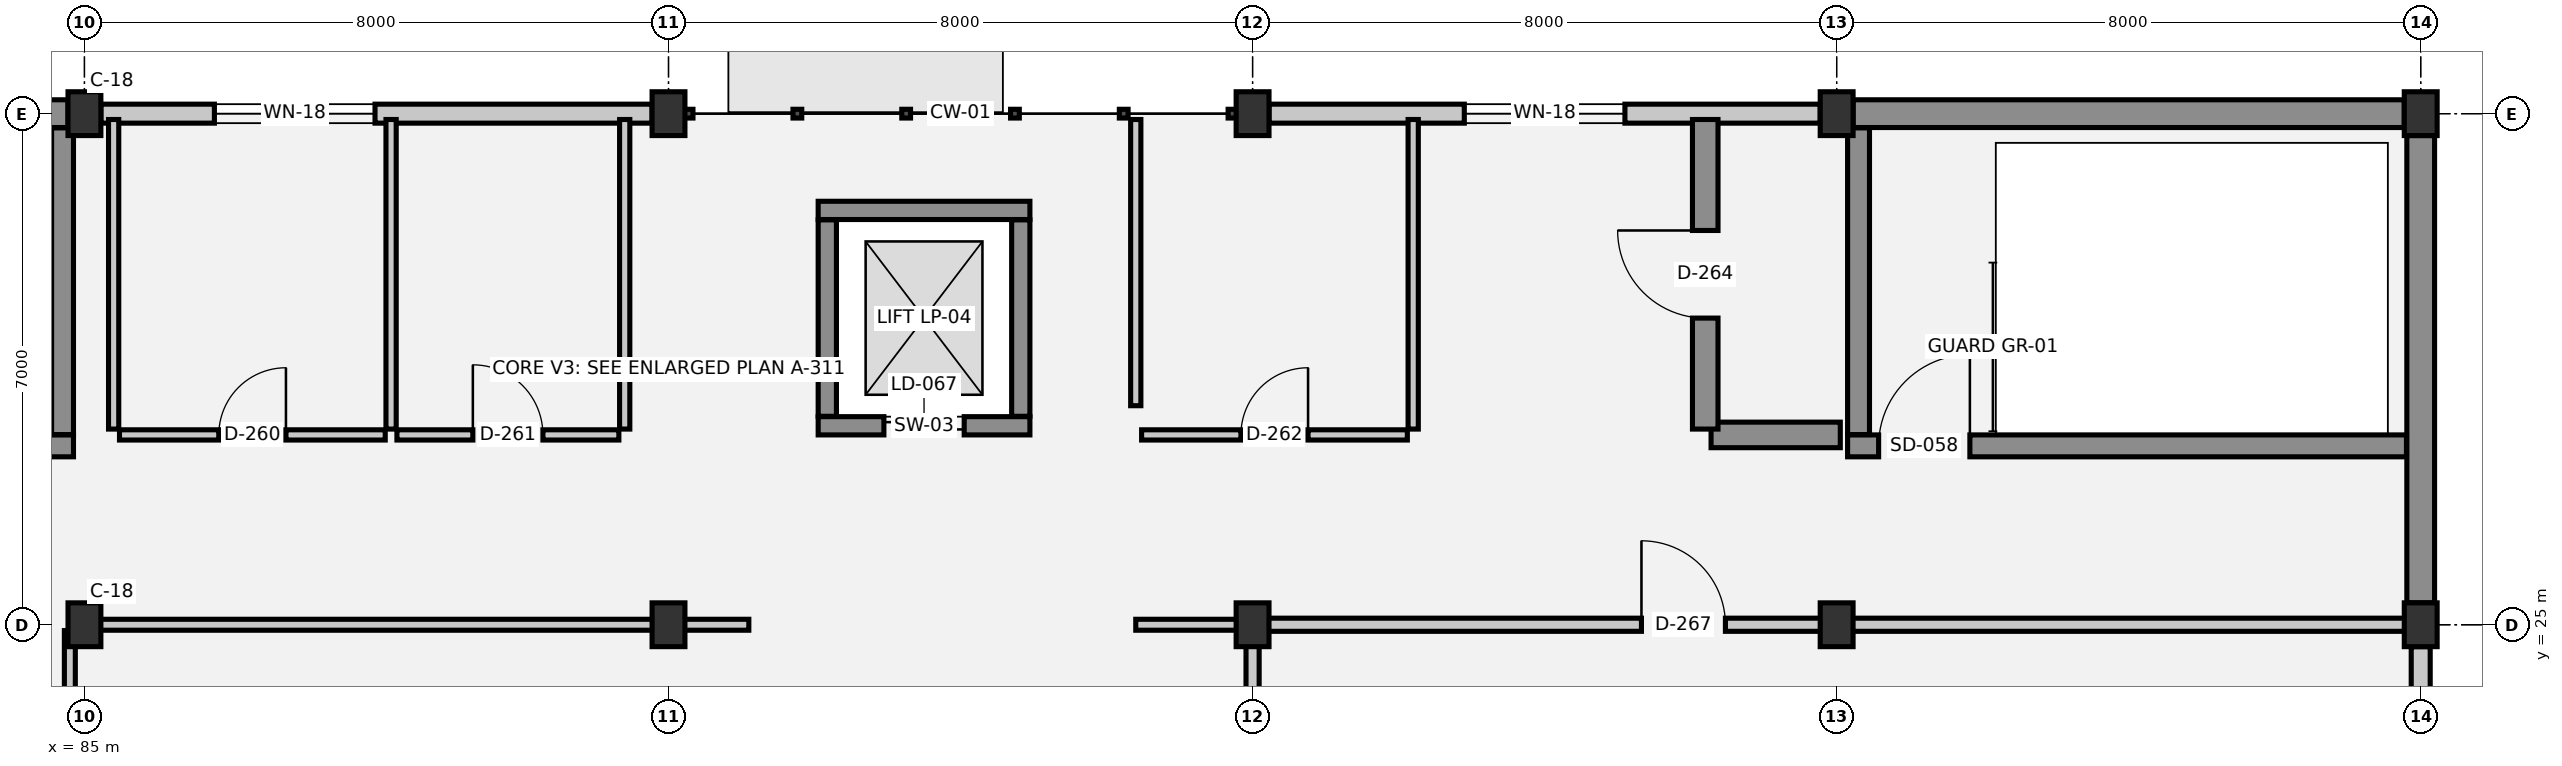
"""IFC4 building model, lengths in metres.
Left out: names, types, materials, properties, quantities, classifications, styles, units other than length and angle.
Written with IfcOpenShell. Run it as: python <this file> out.ifc"""

import sys

from ifc_helpers import new_model, si_unit, direction, frame, frame_2d, origin, origin_2d, place, context, subcontext, project, spatial, rectangle, extrude, element, fill, save


model = new_model("IFC4")
c1 = context("Model", 3, precision=1e-05, world=origin(), true_north=direction((0.0, 1.0)))
c2 = subcontext(c1, "Body", "Model", "MODEL_VIEW")
j1 = project(units=[si_unit("LENGTHUNIT", "METRE"), si_unit("PLANEANGLEUNIT", "RADIAN")], contexts=[c1])
p1 = place(None, origin())
s1 = spatial("IfcSite", under=j1, at=p1, CompositionType="ELEMENT")
p2 = place(p1, origin())
s2 = spatial("IfcBuilding", under=s1, at=p2, CompositionType="ELEMENT")
p3 = place(p2, frame((0.0, 0.0, 22.05)))
s3 = spatial("IfcBuildingStorey", under=s2, at=p3, CompositionType="ELEMENT", Elevation=22.05)
for number, where, z_axis, x_axis in (
    (1, (85.0, 25.0, 0.0), (0.0, 0.0, 1.0), (1.0, 0.0, 0.0)),
    (2, (85.0, 32.0, 0.0), (0.0, 0.0, 1.0), (1.0, 0.0, 0.0)),
    (3, (93.0, 25.0, 0.0), (0.0, 0.0, 1.0), (1.0, 0.0, 0.0)),
    (4, (93.0, 32.0, 0.0), (0.0, 0.0, 1.0), (1.0, 0.0, 0.0)),
    (5, (101.0, 25.0, 0.0), (0.0, 0.0, 1.0), (1.0, 0.0, 0.0)),
    (6, (101.0, 32.0, 0.0), (0.0, 0.0, 1.0), (1.0, 0.0, 0.0)),
    (7, (109.0, 25.0, 0.0), (0.0, 0.0, 1.0), (1.0, 0.0, 0.0)),
    (8, (109.0, 32.0, 0.0), (0.0, 0.0, 1.0), (1.0, 0.0, 0.0)),
    (9, (117.0, 25.0, 0.0), (0.0, 0.0, 1.0), (1.0, 0.0, 0.0)),
    (10, (117.0, 32.0, 0.0), (0.0, 0.0, 1.0), (1.0, 0.0, 0.0)),
):
    element("IfcColumn", number, at=place(p3, frame(where, z_axis=z_axis, x_axis=x_axis)), inside=s3, PredefinedType="COLUMN", context=c2, shape_type="SweptSolid", body=[
        extrude(rectangle(XDim=0.45, YDim=0.6, at=origin_2d()), origin(), (0.0, 0.0, 1.0), 3.75),
    ])
p4 = place(p3, frame((77.225, 32.0, 0.0), z_axis=(0.0, 0.0, 1.0), x_axis=(1.0, 0.0, 0.0)))
e11 = element("IfcWall", 11, at=p4, inside=s3, PredefinedType="STANDARD", context=c2, shape_type="SweptSolid", body=[
    extrude(rectangle(XDim=7.55, YDim=0.38, at=frame_2d((3.775, 0.0))), origin(), (0.0, 0.0, 1.0), 2.71),
])
p5 = place(p3, frame((85.225, 32.0, 0.0), z_axis=(0.0, 0.0, 1.0), x_axis=(1.0, 0.0, 0.0)))
e12 = element("IfcWall", 12, at=p5, inside=s3, PredefinedType="SOLIDWALL", context=c2, shape_type="SweptSolid", body=[
    extrude(rectangle(XDim=7.55, YDim=0.26, at=frame_2d((3.775, 0.0))), origin(), (0.0, 0.0, 1.0), 2.71),
])
p6 = place(p5, frame((1.555, 0.0, 0.9)))
e13 = element("IfcOpeningElement", 13, at=p6, cuts=e12, PredefinedType="OPENING", context=c2, shape_type="SweptSolid", body=[
    extrude(rectangle(XDim=2.2, YDim=1.0, at=frame_2d((1.1, 0.5))), frame((0.0, 0.14, 0.0), z_axis=(0.0, -1.0, 0.0), x_axis=(1.0, 0.0, 0.0)), (0.0, 0.0, 1.0), 0.28),
])
p7 = place(p3, frame((101.225, 32.0, 0.0), z_axis=(0.0, 0.0, 1.0), x_axis=(1.0, 0.0, 0.0)))
e14 = element("IfcWall", 14, at=p7, inside=s3, PredefinedType="SOLIDWALL", context=c2, shape_type="SweptSolid", body=[
    extrude(rectangle(XDim=7.55, YDim=0.26, at=frame_2d((3.775, 0.0))), origin(), (0.0, 0.0, 1.0), 2.71),
])
p8 = place(p7, frame((2.675, 0.0, 0.9)))
e15 = element("IfcOpeningElement", 15, at=p8, cuts=e14, PredefinedType="OPENING", context=c2, shape_type="SweptSolid", body=[
    extrude(rectangle(XDim=2.2, YDim=1.0, at=frame_2d((1.1, 0.5))), frame((0.0, 0.14, 0.0), z_axis=(0.0, -1.0, 0.0), x_axis=(1.0, 0.0, 0.0)), (0.0, 0.0, 1.0), 0.28),
])
p9 = place(p3, frame((109.225, 32.0, 0.0), z_axis=(0.0, 0.0, 1.0), x_axis=(1.0, 0.0, 0.0)))
e16 = element("IfcWall", 16, at=p9, inside=s3, PredefinedType="STANDARD", context=c2, shape_type="SweptSolid", body=[
    extrude(rectangle(XDim=7.55, YDim=0.38, at=frame_2d((3.775, 0.0))), origin(), (0.0, 0.0, 1.0), 2.71),
])
p10 = place(p3, frame((117.0, 31.7, 0.0), z_axis=(0.0, 0.0, 1.0), x_axis=(0.0, -1.0, 0.0)))
e17 = element("IfcWall", 17, at=p10, inside=s3, PredefinedType="STANDARD", context=c2, shape_type="SweptSolid", body=[
    extrude(rectangle(XDim=6.4, YDim=0.38, at=frame_2d((3.2, 0.0))), origin(), (0.0, 0.0, 1.0), 2.71),
])
p11 = place(p3, frame((117.0, 24.7, 0.0), z_axis=(0.0, 0.0, 1.0), x_axis=(0.0, -1.0, 0.0)))
e18 = element("IfcWall", 18, at=p11, inside=s3, PredefinedType="SOLIDWALL", context=c2, shape_type="SweptSolid", body=[
    extrude(rectangle(XDim=7.4, YDim=0.26, at=frame_2d((3.7, 0.0))), origin(), (0.0, 0.0, 1.0), 2.71),
])
p12 = place(p11, frame((2.6, 0.0, 0.9)))
e19 = element("IfcOpeningElement", 19, at=p12, cuts=e18, PredefinedType="OPENING", context=c2, shape_type="SweptSolid", body=[
    extrude(rectangle(XDim=2.2, YDim=1.0, at=frame_2d((1.1, 0.5))), frame((0.0, 0.14, 0.0), z_axis=(0.0, -1.0, 0.0), x_axis=(1.0, 0.0, 0.0)), (0.0, 0.0, 1.0), 0.28),
])
p13 = place(p3, frame((95.05, 27.725, 0.0), z_axis=(0.0, 0.0, 1.0), x_axis=(1.0, 0.0, 0.0)))
e20 = element("IfcWall", 20, at=p13, inside=s3, PredefinedType="SHEAR", context=c2, shape_type="SweptSolid", body=[
    extrude(rectangle(XDim=2.9, YDim=0.25, at=frame_2d((1.45, 0.0))), origin(), (0.0, 0.0, 1.0), 3.47),
])
p14 = place(p13, frame((0.9, 0.0, 0.0)))
e21 = element("IfcOpeningElement", 21, at=p14, cuts=e20, PredefinedType="OPENING", context=c2, shape_type="SweptSolid", body=[
    extrude(rectangle(XDim=1.1, YDim=2.15, at=frame_2d((0.55, 1.075))), frame((0.0, 0.135, 0.0), z_axis=(0.0, -1.0, 0.0), x_axis=(1.0, 0.0, 0.0)), (0.0, 0.0, 1.0), 0.27),
])
p15 = place(p3, frame((97.95, 30.675, 0.0), z_axis=(0.0, 0.0, 1.0), x_axis=(-1.0, 0.0, 0.0)))
e22 = element("IfcWall", 22, at=p15, inside=s3, PredefinedType="SHEAR", context=c2, shape_type="SweptSolid", body=[
    extrude(rectangle(XDim=2.9, YDim=0.25, at=frame_2d((1.45, 0.0))), origin(), (0.0, 0.0, 1.0), 3.47),
])
for number, where, z_axis, x_axis in (
    (23, (95.175, 30.545, 0.0), (0.0, 0.0, 1.0), (0.0, -1.0, 0.0)),
    (24, (97.825, 27.855, 0.0), (0.0, 0.0, 1.0), (0.0, 1.0, 0.0)),
):
    element("IfcWall", number, at=place(p3, frame(where, z_axis=z_axis, x_axis=x_axis)), inside=s3, PredefinedType="SHEAR", context=c2, shape_type="SweptSolid", body=[
        extrude(rectangle(XDim=2.69, YDim=0.25, at=frame_2d((1.345, 0.0))), origin(), (0.0, 0.0, 1.0), 3.47),
    ])
p16 = place(p3, frame((77.195, 27.45, 0.0), z_axis=(0.0, 0.0, 1.0), x_axis=(1.0, 0.0, 0.0)))
e25 = element("IfcWall", 25, at=p16, inside=s3, PredefinedType="SHEAR", context=c2, shape_type="SweptSolid", body=[
    extrude(rectangle(XDim=7.655, YDim=0.3, at=frame_2d((3.828, 0.0))), origin(), (0.0, 0.0, 1.0), 3.47),
])
p17 = place(p16, frame((0.38, 0.0, 0.0)))
e26 = element("IfcOpeningElement", 26, at=p17, cuts=e25, PredefinedType="OPENING", context=c2, shape_type="SweptSolid", body=[
    extrude(rectangle(XDim=1.25, YDim=2.15, at=frame_2d((0.625, 1.075))), frame((0.0, 0.16, 0.0), z_axis=(0.0, -1.0, 0.0), x_axis=(1.0, 0.0, 0.0)), (0.0, 0.0, 1.0), 0.32),
])
p18 = place(p3, frame((84.7, 27.605, 0.0), z_axis=(0.0, 0.0, 1.0), x_axis=(0.0, 1.0, 0.0)))
e27 = element("IfcWall", 27, at=p18, inside=s3, PredefinedType="SHEAR", context=c2, shape_type="SweptSolid", body=[
    extrude(rectangle(XDim=4.2, YDim=0.3, at=frame_2d((2.1, 0.0))), origin(), (0.0, 0.0, 1.0), 3.47),
])
p19 = place(p3, frame((109.15, 27.45, 0.0), z_axis=(0.0, 0.0, 1.0), x_axis=(1.0, 0.0, 0.0)))
e28 = element("IfcWall", 28, at=p19, inside=s3, PredefinedType="SHEAR", context=c2, shape_type="SweptSolid", body=[
    extrude(rectangle(XDim=7.655, YDim=0.3, at=frame_2d((3.828, 0.0))), origin(), (0.0, 0.0, 1.0), 3.47),
])
p20 = place(p19, frame((0.425, 0.0, 0.0)))
e29 = element("IfcOpeningElement", 29, at=p20, cuts=e28, PredefinedType="OPENING", context=c2, shape_type="SweptSolid", body=[
    extrude(rectangle(XDim=1.25, YDim=2.15, at=frame_2d((0.625, 1.075))), frame((0.0, 0.16, 0.0), z_axis=(0.0, -1.0, 0.0), x_axis=(1.0, 0.0, 0.0)), (0.0, 0.0, 1.0), 0.32),
])
p21 = place(p3, frame((109.3, 31.805, 0.0), z_axis=(0.0, 0.0, 1.0), x_axis=(0.0, -1.0, 0.0)))
e30 = element("IfcWall", 30, at=p21, inside=s3, PredefinedType="SHEAR", context=c2, shape_type="SweptSolid", body=[
    extrude(rectangle(XDim=4.2, YDim=0.3, at=frame_2d((2.1, 0.0))), origin(), (0.0, 0.0, 1.0), 3.47),
])
p22 = place(p3, frame((84.88, 25.0, 0.0), z_axis=(0.0, 0.0, 1.0), x_axis=(1.0, 0.0, 0.0)))
e31 = element("IfcWall", 31, at=p22, inside=s3, PredefinedType="PARTITIONING", context=c2, shape_type="SweptSolid", body=[
    extrude(rectangle(XDim=9.22, YDim=0.15, at=frame_2d((4.61, 0.0))), origin(), (0.0, 0.0, 1.0), 2.83),
])
p23 = place(p3, frame((99.4, 25.0, 0.0), z_axis=(0.0, 0.0, 1.0), x_axis=(1.0, 0.0, 0.0)))
e32 = element("IfcWall", 32, at=p23, inside=s3, PredefinedType="PARTITIONING", context=c2, shape_type="SweptSolid", body=[
    extrude(rectangle(XDim=1.52, YDim=0.15, at=frame_2d((0.76, 0.0))), origin(), (0.0, 0.0, 1.0), 2.83),
])
p24 = place(p3, frame((101.08, 25.0, 0.0), z_axis=(0.0, 0.0, 1.0), x_axis=(1.0, 0.0, 0.0)))
e33 = element("IfcWall", 33, at=p24, inside=s3, PredefinedType="PARTITIONING", context=c2, shape_type="SweptSolid", body=[
    extrude(rectangle(XDim=15.84, YDim=0.18, at=frame_2d((7.92, 0.0))), origin(), (0.0, 0.0, 1.0), 2.83),
])
p25 = place(p24, frame((5.247, 0.0, 0.0)))
e34 = element("IfcOpeningElement", 34, at=p25, cuts=e33, PredefinedType="OPENING", context=c2, shape_type="SweptSolid", body=[
    extrude(rectangle(XDim=1.15, YDim=2.2, at=frame_2d((0.575, 1.1))), frame((0.0, 0.1, 0.0), z_axis=(0.0, -1.0, 0.0), x_axis=(1.0, 0.0, 0.0)), (0.0, 0.0, 1.0), 0.2),
])
p26 = place(p3, frame((85.48, 27.6, 0.0), z_axis=(0.0, 0.0, 1.0), x_axis=(1.0, 0.0, 0.0)))
e35 = element("IfcWall", 35, at=p26, inside=s3, PredefinedType="PLUMBINGWALL", context=c2, shape_type="SweptSolid", body=[
    extrude(rectangle(XDim=3.64, YDim=0.14, at=frame_2d((1.82, 0.0))), origin(), (0.0, 0.0, 1.0), 3.39),
])
p27 = place(p26, frame((1.36, 0.0, 0.0)))
e36 = element("IfcOpeningElement", 36, at=p27, cuts=e35, PredefinedType="OPENING", context=c2, shape_type="SweptSolid", body=[
    extrude(rectangle(XDim=0.92, YDim=2.1, at=frame_2d((0.46, 1.05))), frame((0.0, 0.08, 0.0), z_axis=(0.0, -1.0, 0.0), x_axis=(1.0, 0.0, 0.0)), (0.0, 0.0, 1.0), 0.16),
])
p28 = place(p3, frame((89.28, 27.6, 0.0), z_axis=(0.0, 0.0, 1.0), x_axis=(1.0, 0.0, 0.0)))
e37 = element("IfcWall", 37, at=p28, inside=s3, PredefinedType="PLUMBINGWALL", context=c2, shape_type="SweptSolid", body=[
    extrude(rectangle(XDim=3.04, YDim=0.14, at=frame_2d((1.52, 0.0))), origin(), (0.0, 0.0, 1.0), 3.39),
])
p29 = place(p28, frame((1.04, 0.0, 0.0)))
e38 = element("IfcOpeningElement", 38, at=p29, cuts=e37, PredefinedType="OPENING", context=c2, shape_type="SweptSolid", body=[
    extrude(rectangle(XDim=0.96, YDim=2.1, at=frame_2d((0.48, 1.05))), frame((0.0, 0.08, 0.0), z_axis=(0.0, -1.0, 0.0), x_axis=(1.0, 0.0, 0.0)), (0.0, 0.0, 1.0), 0.16),
])
p30 = place(p3, frame((99.48, 27.6, 0.0), z_axis=(0.0, 0.0, 1.0), x_axis=(1.0, 0.0, 0.0)))
e39 = element("IfcWall", 39, at=p30, inside=s3, PredefinedType="PLUMBINGWALL", context=c2, shape_type="SweptSolid", body=[
    extrude(rectangle(XDim=3.64, YDim=0.14, at=frame_2d((1.82, 0.0))), origin(), (0.0, 0.0, 1.0), 3.39),
])
p31 = place(p30, frame((1.36, 0.0, 0.0)))
e40 = element("IfcOpeningElement", 40, at=p31, cuts=e39, PredefinedType="OPENING", context=c2, shape_type="SweptSolid", body=[
    extrude(rectangle(XDim=0.92, YDim=2.1, at=frame_2d((0.46, 1.05))), frame((0.0, 0.08, 0.0), z_axis=(0.0, -1.0, 0.0), x_axis=(1.0, 0.0, 0.0)), (0.0, 0.0, 1.0), 0.16),
])
p32 = place(p3, frame((107.28, 27.6, 0.0), z_axis=(0.0, 0.0, 1.0), x_axis=(1.0, 0.0, 0.0)))
e41 = element("IfcWall", 41, at=p32, inside=s3, PredefinedType="SHEAR", context=c2, shape_type="SweptSolid", body=[
    extrude(rectangle(XDim=1.77, YDim=0.35, at=frame_2d((0.885, 0.0))), origin(), (0.0, 0.0, 1.0), 3.39),
])
p33 = place(p3, frame((84.8, 10.08, 0.0), z_axis=(0.0, 0.0, 1.0), x_axis=(0.0, 1.0, 0.0)))
e42 = element("IfcWall", 42, at=p33, inside=s3, PredefinedType="PARTITIONING", context=c2, shape_type="SweptSolid", body=[
    extrude(rectangle(XDim=14.84, YDim=0.15, at=frame_2d((7.42, 0.0))), origin(), (0.0, 0.0, 1.0), 2.88),
])
p34 = place(p33, frame((4.687, 0.0, 0.0)))
e43 = element("IfcOpeningElement", 43, at=p34, cuts=e42, PredefinedType="OPENING", context=c2, shape_type="SweptSolid", body=[
    extrude(rectangle(XDim=1.75, YDim=2.3, at=frame_2d((0.875, 1.15))), frame((0.0, 0.085, 0.0), z_axis=(0.0, -1.0, 0.0), x_axis=(1.0, 0.0, 0.0)), (0.0, 0.0, 1.0), 0.17),
])
for number, where, z_axis, x_axis in (
    (44, (85.4, 27.68, 0.0), (0.0, 0.0, 1.0), (0.0, 1.0, 0.0)),
    (45, (89.2, 27.68, 0.0), (0.0, 0.0, 1.0), (0.0, 1.0, 0.0)),
    (46, (92.4, 27.68, 0.0), (0.0, 0.0, 1.0), (0.0, 1.0, 0.0)),
):
    element("IfcWall", number, at=place(p3, frame(where, z_axis=z_axis, x_axis=x_axis)), inside=s3, PredefinedType="PLUMBINGWALL", context=c2, shape_type="SweptSolid", body=[
        extrude(rectangle(XDim=4.24, YDim=0.14, at=frame_2d((2.12, 0.0))), origin(), (0.0, 0.0, 1.0), 3.39),
    ])
p35 = place(p3, frame((99.4, 28.0, 0.0), z_axis=(0.0, 0.0, 1.0), x_axis=(0.0, 1.0, 0.0)))
e47 = element("IfcWall", 47, at=p35, inside=s3, PredefinedType="PLUMBINGWALL", context=c2, shape_type="SweptSolid", body=[
    extrude(rectangle(XDim=3.92, YDim=0.14, at=frame_2d((1.96, 0.0))), origin(), (0.0, 0.0, 1.0), 3.39),
])
p36 = place(p3, frame((101.0, 10.08, 0.0), z_axis=(0.0, 0.0, 1.0), x_axis=(0.0, 1.0, 0.0)))
e48 = element("IfcWall", 48, at=p36, inside=s3, PredefinedType="PARTITIONING", context=c2, shape_type="SweptSolid", body=[
    extrude(rectangle(XDim=14.84, YDim=0.18, at=frame_2d((7.42, 0.0))), origin(), (0.0, 0.0, 1.0), 2.88),
])
p37 = place(p3, frame((103.2, 27.68, 0.0), z_axis=(0.0, 0.0, 1.0), x_axis=(0.0, 1.0, 0.0)))
e49 = element("IfcWall", 49, at=p37, inside=s3, PredefinedType="PLUMBINGWALL", context=c2, shape_type="SweptSolid", body=[
    extrude(rectangle(XDim=4.24, YDim=0.14, at=frame_2d((2.12, 0.0))), origin(), (0.0, 0.0, 1.0), 3.39),
])
p38 = place(p3, frame((107.2, 27.68, 0.0), z_axis=(0.0, 0.0, 1.0), x_axis=(0.0, 1.0, 0.0)))
e50 = element("IfcWall", 50, at=p38, inside=s3, PredefinedType="SHEAR", context=c2, shape_type="SweptSolid", body=[
    extrude(rectangle(XDim=4.24, YDim=0.35, at=frame_2d((2.12, 0.0))), origin(), (0.0, 0.0, 1.0), 3.39),
])
p39 = place(p38, frame((1.52, 0.0, 0.0)))
e51 = element("IfcOpeningElement", 51, at=p39, cuts=e50, PredefinedType="OPENING", context=c2, shape_type="SweptSolid", body=[
    extrude(rectangle(XDim=1.2, YDim=2.15, at=frame_2d((0.6, 1.075))), frame((0.0, 0.185, 0.0), z_axis=(0.0, -1.0, 0.0), x_axis=(1.0, 0.0, 0.0)), (0.0, 0.0, 1.0), 0.37),
])
p40 = place(p6, origin())
e52 = element("IfcWindow", 52, at=p40, inside=s3, PartitioningType="SINGLE_PANEL", PredefinedType="WINDOW", context=c2, shape_type="SweptSolid", body=[
    extrude(rectangle(XDim=2.2, YDim=1.0, at=frame_2d((1.1, 0.5))), frame((0.0, 0.03, 0.0), z_axis=(0.0, -1.0, 0.0), x_axis=(1.0, 0.0, 0.0)), (0.0, 0.0, 1.0), 0.06),
])
fill(e13, e52)
p41 = place(p8, origin())
e53 = element("IfcWindow", 53, at=p41, inside=s3, PartitioningType="SINGLE_PANEL", PredefinedType="WINDOW", context=c2, shape_type="SweptSolid", body=[
    extrude(rectangle(XDim=2.2, YDim=1.0, at=frame_2d((1.1, 0.5))), frame((0.0, 0.03, 0.0), z_axis=(0.0, -1.0, 0.0), x_axis=(1.0, 0.0, 0.0)), (0.0, 0.0, 1.0), 0.06),
])
fill(e15, e53)
p42 = place(p14, origin())
e54 = element("IfcDoor", 54, at=p42, inside=s3, OperationType="DOUBLE_DOOR_SLIDING", PredefinedType="DOOR", context=c2, shape_type="SweptSolid", body=[
    extrude(rectangle(XDim=1.1, YDim=2.15, at=frame_2d((0.55, 1.075))), frame((0.0, 0.025, 0.0), z_axis=(0.0, -1.0, 0.0), x_axis=(1.0, 0.0, 0.0)), (0.0, 0.0, 1.0), 0.05),
])
fill(e21, e54)
p43 = place(p20, origin())
e55 = element("IfcDoor", 55, at=p43, inside=s3, OperationType="SINGLE_SWING_RIGHT", PredefinedType="DOOR", context=c2, shape_type="SweptSolid", body=[
    extrude(rectangle(XDim=1.25, YDim=2.15, at=frame_2d((0.625, 1.075))), frame((0.0, 0.025, 0.0), z_axis=(0.0, -1.0, 0.0), x_axis=(1.0, 0.0, 0.0)), (0.0, 0.0, 1.0), 0.05),
])
fill(e29, e55)
p44 = place(p27, origin())
e56 = element("IfcDoor", 56, at=p44, inside=s3, OperationType="SINGLE_SWING_RIGHT", PredefinedType="DOOR", context=c2, shape_type="SweptSolid", body=[
    extrude(rectangle(XDim=0.92, YDim=2.1, at=frame_2d((0.46, 1.05))), frame((0.0, 0.025, 0.0), z_axis=(0.0, -1.0, 0.0), x_axis=(1.0, 0.0, 0.0)), (0.0, 0.0, 1.0), 0.05),
])
fill(e36, e56)
p45 = place(p29, origin())
e57 = element("IfcDoor", 57, at=p45, inside=s3, OperationType="SINGLE_SWING_LEFT", PredefinedType="DOOR", context=c2, shape_type="SweptSolid", body=[
    extrude(rectangle(XDim=0.96, YDim=2.1, at=frame_2d((0.48, 1.05))), frame((0.0, 0.025, 0.0), z_axis=(0.0, -1.0, 0.0), x_axis=(1.0, 0.0, 0.0)), (0.0, 0.0, 1.0), 0.05),
])
fill(e38, e57)
p46 = place(p31, origin())
e58 = element("IfcDoor", 58, at=p46, inside=s3, OperationType="SINGLE_SWING_RIGHT", PredefinedType="DOOR", context=c2, shape_type="SweptSolid", body=[
    extrude(rectangle(XDim=0.92, YDim=2.1, at=frame_2d((0.46, 1.05))), frame((0.0, 0.025, 0.0), z_axis=(0.0, -1.0, 0.0), x_axis=(1.0, 0.0, 0.0)), (0.0, 0.0, 1.0), 0.05),
])
fill(e40, e58)
p47 = place(p39, origin())
e59 = element("IfcDoor", 59, at=p47, inside=s3, OperationType="SINGLE_SWING_RIGHT", PredefinedType="DOOR", context=c2, shape_type="SweptSolid", body=[
    extrude(rectangle(XDim=1.2, YDim=2.15, at=frame_2d((0.6, 1.075))), frame((0.0, 0.025, 0.0), z_axis=(0.0, -1.0, 0.0), x_axis=(1.0, 0.0, 0.0)), (0.0, 0.0, 1.0), 0.05),
])
fill(e51, e59)
p48 = place(p25, origin())
e60 = element("IfcDoor", 60, at=p48, inside=s3, OperationType="SINGLE_SWING_LEFT", PredefinedType="DOOR", context=c2, shape_type="SweptSolid", body=[
    extrude(rectangle(XDim=1.15, YDim=2.2, at=frame_2d((0.575, 1.1))), frame((0.0, 0.025, 0.0), z_axis=(0.0, -1.0, 0.0), x_axis=(1.0, 0.0, 0.0)), (0.0, 0.0, 1.0), 0.05),
])
fill(e34, e60)
save(model, sys.argv[1])
